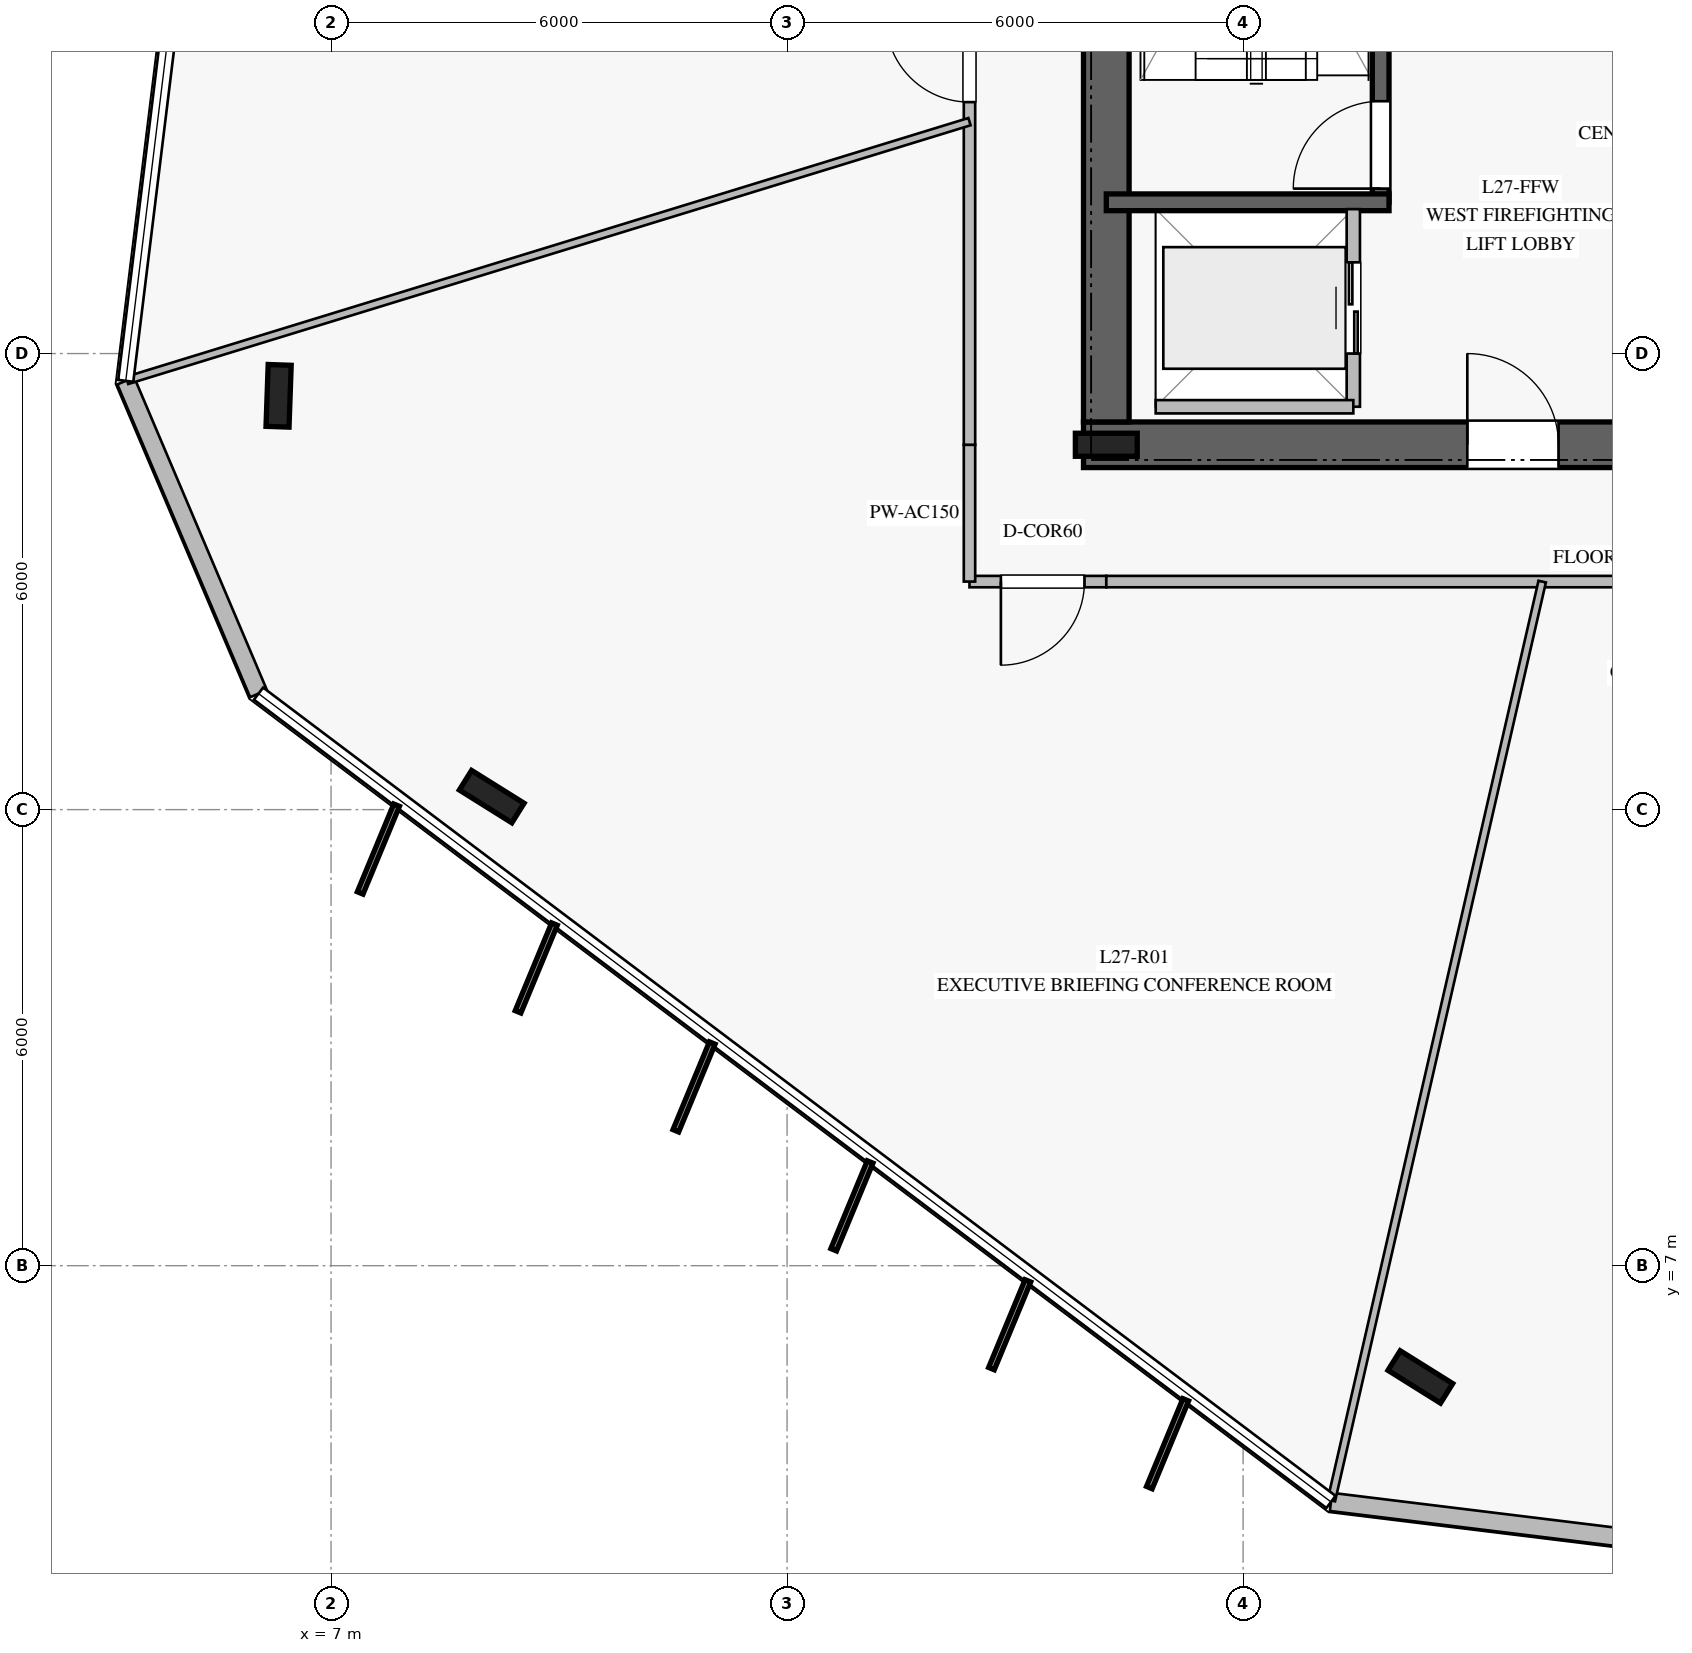
"""IFC4 building model, lengths in metres.
Left out: names, types, materials, properties, quantities, classifications, styles, units other than length and angle.
Written with IfcOpenShell. Run it as: python <this file> out.ifc"""

import sys

from ifc_helpers import new_model, si_unit, direction, frame, frame_2d, origin, origin_2d, place, context, subcontext, project, spatial, rectangle, i_section, extrude, element, fill, save


model = new_model("IFC4")
c1 = context("Model", 3, precision=1e-05, world=origin(), true_north=direction((0.0, 1.0)))
c2 = subcontext(c1, "Body", "Model", "MODEL_VIEW")
j1 = project(units=[si_unit("LENGTHUNIT", "METRE"), si_unit("PLANEANGLEUNIT", "RADIAN")], contexts=[c1])
p1 = place(None, origin())
s1 = spatial("IfcSite", under=j1, at=p1, CompositionType="ELEMENT")
p2 = place(p1, origin())
s2 = spatial("IfcBuilding", under=s1, at=p2, CompositionType="ELEMENT")
p3 = place(p2, frame((0.0, 0.0, 114.4)))
s3 = spatial("IfcBuildingStorey", under=s2, at=p3, CompositionType="ELEMENT", Elevation=114.4)
p4 = place(p3, frame((16.9, 17.8, 0.0), z_axis=(0.0, 0.0, 1.0), x_axis=(1.0, 0.0, 0.0)))
e1 = element("IfcWall", 1, at=p4, inside=s3, PredefinedType="SHEAR", context=c2, shape_type="SweptSolid", body=[
    extrude(rectangle(XDim=16.2, YDim=0.6, at=frame_2d((8.1, 0.0))), origin(), (0.0, 0.0, 1.0), 3.76),
])
p5 = place(p4, frame((5.05, 0.0, 0.0)))
e2 = element("IfcOpeningElement", 2, at=p5, cuts=e1, PredefinedType="OPENING", context=c2, shape_type="SweptSolid", body=[
    extrude(rectangle(XDim=1.2, YDim=2.25, at=frame_2d((0.6, 1.125))), frame((0.0, 0.31, 0.0), z_axis=(0.0, -1.0, 0.0), x_axis=(1.0, 0.0, 0.0)), (0.0, 0.0, 1.0), 0.62),
])
p6 = place(p4, frame((14.0, 0.0, 0.0)))
e3 = element("IfcOpeningElement", 3, at=p6, cuts=e1, PredefinedType="OPENING", context=c2, shape_type="SweptSolid", body=[
    extrude(rectangle(XDim=0.9, YDim=2.1, at=frame_2d((0.45, 1.05))), frame((0.0, 0.31, 0.0), z_axis=(0.0, -1.0, 0.0), x_axis=(1.0, 0.0, 0.0)), (0.0, 0.0, 1.0), 0.62),
])
p7 = place(p4, frame((9.25, 0.0, 0.0)))
e4 = element("IfcOpeningElement", 4, at=p7, cuts=e1, PredefinedType="OPENING", context=c2, shape_type="SweptSolid", body=[
    extrude(rectangle(XDim=1.1, YDim=2.2, at=frame_2d((0.55, 1.1))), frame((0.0, 0.31, 0.0), z_axis=(0.0, -1.0, 0.0), x_axis=(1.0, 0.0, 0.0)), (0.0, 0.0, 1.0), 0.62),
])
p8 = place(p3, frame((17.2, 31.9, 0.0), z_axis=(0.0, 0.0, 1.0), x_axis=(0.0, -1.0, 0.0)))
e5 = element("IfcWall", 5, at=p8, inside=s3, PredefinedType="SHEAR", context=c2, shape_type="SweptSolid", body=[
    extrude(rectangle(XDim=13.8, YDim=0.6, at=frame_2d((6.9, 0.0))), origin(), (0.0, 0.0, 1.0), 3.76),
])
p9 = place(p8, frame((2.05, 0.0, 0.0)))
e6 = element("IfcOpeningElement", 6, at=p9, cuts=e5, PredefinedType="OPENING", context=c2, shape_type="SweptSolid", body=[
    extrude(rectangle(XDim=1.5, YDim=2.2, at=frame_2d((0.75, 1.1))), frame((0.0, 0.31, 0.0), z_axis=(0.0, -1.0, 0.0), x_axis=(1.0, 0.0, 0.0)), (0.0, 0.0, 1.0), 0.62),
])
p10 = place(p3, frame((17.2, 17.8, 0.0), z_axis=(0.0, 0.0, 1.0), x_axis=(1.0, 0.0, 0.0)))
e7 = element("IfcColumn", 7, at=p10, inside=s3, PredefinedType="COLUMN", context=c2, shape_type="SweptSolid", body=[
    extrude(i_section(OverallWidth=0.303, OverallDepth=0.814, WebThickness=0.021, FlangeThickness=0.04, at=origin_2d()), origin(), (0.0, 0.0, 1.0), 4.0),
])
p11 = place(p3, frame((20.81, 20.99, 0.0), z_axis=(0.0, 0.0, 1.0), x_axis=(0.0, 1.0, 0.0)))
e8 = element("IfcWall", 8, at=p11, inside=s3, PredefinedType="SOLIDWALL", context=c2, shape_type="SweptSolid", body=[
    extrude(rectangle(XDim=7.22, YDim=0.22, at=frame_2d((3.61, 0.0))), origin(), (0.0, 0.0, 1.0), 3.76),
])
p12 = place(p11, frame((0.18, 0.0, 0.0)))
e9 = element("IfcOpeningElement", 9, at=p12, cuts=e8, PredefinedType="OPENING", context=c2, shape_type="SweptSolid", body=[
    extrude(rectangle(XDim=1.15, YDim=2.2, at=frame_2d((0.575, 1.1))), frame((0.0, 0.12, 0.0), z_axis=(0.0, -1.0, 0.0), x_axis=(1.0, 0.0, 0.0)), (0.0, 0.0, 1.0), 0.24),
])
p13 = place(p3, frame((17.2, 20.99, 0.0), z_axis=(0.0, 0.0, 1.0), x_axis=(1.0, 0.0, 0.0)))
e10 = element("IfcWall", 10, at=p13, inside=s3, PredefinedType="SOLIDWALL", context=c2, shape_type="SweptSolid", body=[
    extrude(rectangle(XDim=3.72, YDim=0.22, at=frame_2d((1.86, 0.0))), origin(), (0.0, 0.0, 1.0), 3.76),
])
for number, where, z_axis, x_axis in (
    (11, (6.31, 18.444, 0.0), (0.0, 0.0, 1.0), (0.035, 0.999, 0.0)),
    (12, (9.114, 13.171, 0.0), (0.0, 0.0, 1.0), (-0.848, 0.53, 0.0)),
    (13, (21.332, 5.536, 0.0), (0.0, 0.0, 1.0), (-0.848, 0.53, 0.0)),
):
    element("IfcColumn", number, at=place(p3, frame(where, z_axis=z_axis, x_axis=x_axis)), inside=s3, PredefinedType="COLUMN", context=c2, shape_type="SweptSolid", body=[
        extrude(i_section(OverallWidth=0.303, OverallDepth=0.814, WebThickness=0.021, FlangeThickness=0.04, at=origin_2d()), origin(), (0.0, 0.0, 1.0), 4.0),
    ])
p14 = place(p3, frame((4.299, 18.641, 0.0), z_axis=(0.0, 0.0, 1.0), x_axis=(0.390733557702, -0.920503822309, 0.0)))
e14 = element("IfcWall", 14, at=p14, inside=s3, PredefinedType="STANDARD", context=c2, shape_type="SweptSolid", body=[
    extrude(rectangle(XDim=4.471, YDim=0.24, at=frame_2d((2.235, 0.0))), origin(), (0.0, 0.0, 1.0), 3.76),
])
p15 = place(p3, frame((20.156, 3.892, 0.0), z_axis=(0.0, 0.0, 1.0), x_axis=(0.992565806089, -0.121709163922, 0.0)))
e15 = element("IfcWall", 15, at=p15, inside=s3, PredefinedType="STANDARD", context=c2, shape_type="SweptSolid", body=[
    extrude(rectangle(XDim=4.471, YDim=0.24, at=frame_2d((2.236, 0.0))), origin(), (0.0, 0.0, 1.0), 3.76),
])
p16 = place(p3, frame((20.45, 18.3, 0.0), z_axis=(0.0, 0.0, 1.0), x_axis=(0.0, 1.0, 0.0)))
e16 = element("IfcWall", 16, at=p16, inside=s3, PredefinedType="PARTITIONING", context=c2, shape_type="SweptSolid", body=[
    extrude(rectangle(XDim=2.6, YDim=0.175, at=frame_2d((1.3, 0.0))), origin(), (0.0, 0.0, 1.0), 3.76),
])
p17 = place(p16, frame((0.7, 0.0, 0.0)))
e17 = element("IfcOpeningElement", 17, at=p17, cuts=e16, PredefinedType="OPENING", context=c2, shape_type="SweptSolid", body=[
    extrude(rectangle(XDim=1.2, YDim=2.2, at=frame_2d((0.6, 1.1))), frame((0.0, 0.098, 0.0), z_axis=(0.0, -1.0, 0.0), x_axis=(1.0, 0.0, 0.0)), (0.0, 0.0, 1.0), 0.195),
])
p18 = place(p3, frame((17.85, 18.3, 0.0), z_axis=(0.0, 0.0, 1.0), x_axis=(1.0, 0.0, 0.0)))
e18 = element("IfcWall", 18, at=p18, inside=s3, PredefinedType="PARTITIONING", context=c2, shape_type="SweptSolid", body=[
    extrude(rectangle(XDim=2.6, YDim=0.175, at=frame_2d((1.3, 0.0))), origin(), (0.0, 0.0, 1.0), 3.76),
])
p19 = place(p3, frame((17.2, 16.0, 0.0), z_axis=(0.0, 0.0, 1.0), x_axis=(-1.0, 0.0, 0.0)))
e19 = element("IfcWall", 19, at=p19, inside=s3, PredefinedType="PARTITIONING", context=c2, shape_type="SweptSolid", body=[
    extrude(rectangle(XDim=1.8, YDim=0.15, at=frame_2d((0.9, 0.0))), origin(), (0.0, 0.0, 1.0), 3.36),
])
p20 = place(p19, frame((0.287, 0.0, 0.0)))
e20 = element("IfcOpeningElement", 20, at=p20, cuts=e19, PredefinedType="OPENING", context=c2, shape_type="SweptSolid", body=[
    extrude(rectangle(XDim=1.1, YDim=2.2, at=frame_2d((0.55, 1.1))), frame((0.0, 0.085, 0.0), z_axis=(0.0, -1.0, 0.0), x_axis=(1.0, 0.0, 0.0)), (0.0, 0.0, 1.0), 0.17),
])
p21 = place(p3, frame((15.4, 16.0, 0.0), z_axis=(0.0, 0.0, 1.0), x_axis=(0.0, 1.0, 0.0)))
e21 = element("IfcWall", 21, at=p21, inside=s3, PredefinedType="PARTITIONING", context=c2, shape_type="SweptSolid", body=[
    extrude(rectangle(XDim=1.8, YDim=0.15, at=frame_2d((0.9, 0.0))), origin(), (0.0, 0.0, 1.0), 3.21),
])
p22 = place(p3, frame((15.4, 17.8, 0.0), z_axis=(0.0, 0.0, 1.0), x_axis=(0.0, 1.0, 0.0)))
e22 = element("IfcWall", 22, at=p22, inside=s3, PredefinedType="PARTITIONING", context=c2, shape_type="SweptSolid", body=[
    extrude(rectangle(XDim=6.25, YDim=0.15, at=frame_2d((3.125, 0.0))), origin(), (0.0, 0.0, 1.0), 3.21),
])
p23 = place(p22, frame((4.508, 0.0, 0.0)))
e23 = element("IfcOpeningElement", 23, at=p23, cuts=e22, PredefinedType="OPENING", context=c2, shape_type="SweptSolid", body=[
    extrude(rectangle(XDim=1.1, YDim=2.2, at=frame_2d((0.55, 1.1))), frame((0.0, 0.085, 0.0), z_axis=(0.0, -1.0, 0.0), x_axis=(1.0, 0.0, 0.0)), (0.0, 0.0, 1.0), 0.17),
])
p24 = place(p3, frame((24.05, 16.0, 0.0), z_axis=(0.0, 0.0, 1.0), x_axis=(-1.0, 0.0, 0.0)))
e24 = element("IfcWall", 24, at=p24, inside=s3, PredefinedType="PARTITIONING", context=c2, shape_type="SweptSolid", body=[
    extrude(rectangle(XDim=6.85, YDim=0.15, at=frame_2d((3.425, 0.0))), origin(), (0.0, 0.0, 1.0), 3.21),
])
p25 = place(p3, frame((15.4, 22.051, 0.0), z_axis=(0.0, 0.0, 1.0), x_axis=(-0.955926859448, -0.293604903544, 0.0)))
e25 = element("IfcWall", 25, at=p25, inside=s3, PredefinedType="MOVABLE", context=c2, shape_type="SweptSolid", body=[
    extrude(rectangle(XDim=11.594, YDim=0.1, at=frame_2d((5.797, 0.0))), origin(), (0.0, 0.0, 1.0), 3.05),
])
p26 = place(p3, frame((22.935, 16.0, 0.0), z_axis=(0.0, 0.0, 1.0), x_axis=(-0.223663289935, -0.974666472561, 0.0)))
e26 = element("IfcWall", 26, at=p26, inside=s3, PredefinedType="MOVABLE", context=c2, shape_type="SweptSolid", body=[
    extrude(rectangle(XDim=12.403, YDim=0.1, at=frame_2d((6.202, 0.0))), origin(), (0.0, 0.0, 1.0), 3.16),
])
p27 = place(p12, origin())
e27 = element("IfcDoor", 27, at=p27, inside=s3, OperationType="SINGLE_SWING_LEFT", PredefinedType="DOOR", context=c2, shape_type="SweptSolid", body=[
    extrude(rectangle(XDim=1.15, YDim=2.2, at=frame_2d((0.575, 1.1))), frame((0.0, 0.025, 0.0), z_axis=(0.0, -1.0, 0.0), x_axis=(1.0, 0.0, 0.0)), (0.0, 0.0, 1.0), 0.05),
])
fill(e9, e27)
p28 = place(p5, origin())
e28 = element("IfcDoor", 28, at=p28, inside=s3, OperationType="SINGLE_SWING_LEFT", PredefinedType="DOOR", context=c2, shape_type="SweptSolid", body=[
    extrude(rectangle(XDim=1.2, YDim=2.25, at=frame_2d((0.6, 1.125))), frame((0.0, 0.025, 0.0), z_axis=(0.0, -1.0, 0.0), x_axis=(1.0, 0.0, 0.0)), (0.0, 0.0, 1.0), 0.05),
])
fill(e2, e28)
p29 = place(p17, origin())
e29 = element("IfcDoor", 29, at=p29, inside=s3, OperationType="DOUBLE_DOOR_SLIDING", PredefinedType="DOOR", context=c2, shape_type="SweptSolid", body=[
    extrude(rectangle(XDim=1.2, YDim=2.2, at=frame_2d((0.6, 1.1))), frame((0.0, 0.025, 0.0), z_axis=(0.0, -1.0, 0.0), x_axis=(1.0, 0.0, 0.0)), (0.0, 0.0, 1.0), 0.05),
])
fill(e17, e29)
p30 = place(p20, origin())
e30 = element("IfcDoor", 30, at=p30, inside=s3, OperationType="SINGLE_SWING_RIGHT", PredefinedType="DOOR", context=c2, shape_type="SweptSolid", body=[
    extrude(rectangle(XDim=1.1, YDim=2.2, at=frame_2d((0.55, 1.1))), frame((0.0, 0.025, 0.0), z_axis=(0.0, -1.0, 0.0), x_axis=(1.0, 0.0, 0.0)), (0.0, 0.0, 1.0), 0.05),
])
fill(e20, e30)
p31 = place(p23, origin())
e31 = element("IfcDoor", 31, at=p31, inside=s3, OperationType="SINGLE_SWING_RIGHT", PredefinedType="DOOR", context=c2, shape_type="SweptSolid", body=[
    extrude(rectangle(XDim=1.1, YDim=2.2, at=frame_2d((0.55, 1.1))), frame((0.0, 0.025, 0.0), z_axis=(0.0, -1.0, 0.0), x_axis=(1.0, 0.0, 0.0)), (0.0, 0.0, 1.0), 0.05),
])
fill(e23, e31)
save(model, sys.argv[1])
